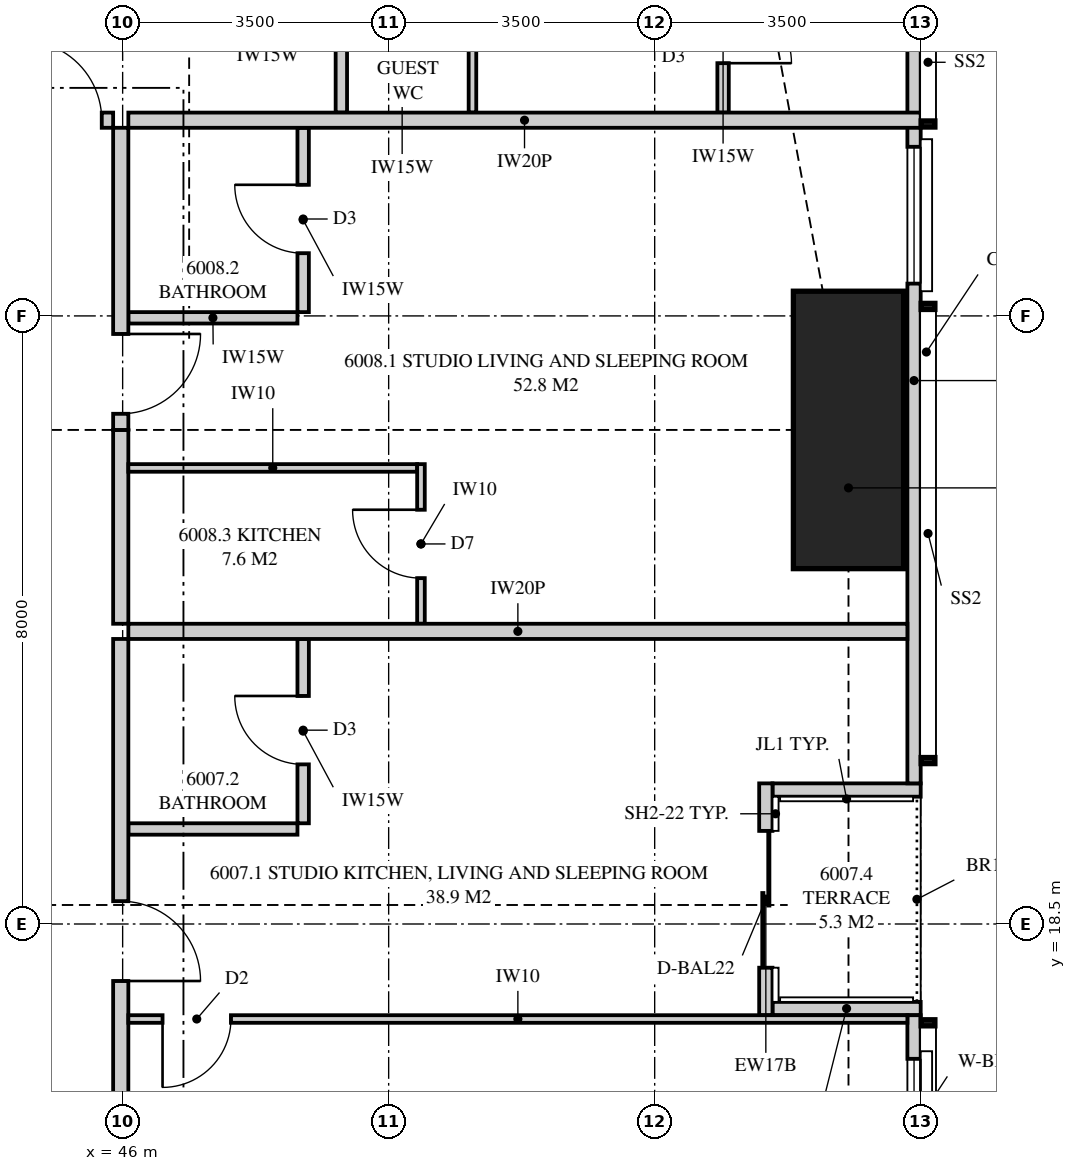
"""IFC4 building model, lengths in metres.
Left out: names, types, materials, properties, quantities, classifications, styles, units other than length and angle.
Written with IfcOpenShell. Run it as: python <this file> out.ifc"""

import sys

from ifc_helpers import new_model, si_unit, direction, frame, frame_2d, origin, origin_2d, place, context, subcontext, project, spatial, polyline, rectangle, outline, extrude, element, fill, save


model = new_model("IFC4")
c1 = context("Model", 3, precision=1e-05, world=origin(), true_north=direction((0.0, 1.0)))
c2 = subcontext(c1, "Body", "Model", "MODEL_VIEW")
j1 = project(units=[si_unit("LENGTHUNIT", "METRE"), si_unit("PLANEANGLEUNIT", "RADIAN")], contexts=[c1])
p1 = place(None, origin())
s1 = spatial("IfcSite", under=j1, at=p1, CompositionType="ELEMENT")
p2 = place(p1, origin())
s2 = spatial("IfcBuilding", under=s1, at=p2, CompositionType="ELEMENT")
p3 = place(p2, frame((0.0, 0.0, 221.45)))
s3 = spatial("IfcBuildingStorey", under=s2, at=p3, CompositionType="ELEMENT", Elevation=221.45)
p4 = place(p3, frame((55.55, 25.0, 0.0), z_axis=(0.0, 0.0, 1.0), x_axis=(1.0, 0.0, 0.0)))
e1 = element("IfcColumn", 1, at=p4, inside=s3, PredefinedType="COLUMN", context=c2, shape_type="SweptSolid", body=[
    extrude(rectangle(XDim=1.45, YDim=3.65, at=origin_2d()), origin(), (0.0, 0.0, 1.0), 3.5),
])
p5 = place(p3, frame((56.413, 3.051, 0.0), z_axis=(0.0, 0.0, 1.0), x_axis=(0.0, 1.0, 0.0)))
e2 = element("IfcWall", 2, at=p5, inside=s3, PredefinedType="SOLIDWALL", context=c2, shape_type="SweptSolid", body=[
    extrude(outline(polyline([(0.0, 0.0), (14.249, 0.0), (14.249, 2.3), (9.949, 2.3), (9.949, 3.26), (9.858, 3.26), (9.858, 2.3), (9.688, 2.3), (9.688, 3.26), (0.0, 3.26), (0.0, 0.0)])), frame((0.0, 0.087, 0.0), z_axis=(0.0, -1.0, 0.0), x_axis=(1.0, 0.0, 0.0)), (0.0, 0.0, 1.0), 0.175),
])
p6 = place(p5, frame((1.487, 0.0, 0.4)))
e3 = element("IfcOpeningElement", 3, at=p6, cuts=e2, PredefinedType="OPENING", context=c2, shape_type="SweptSolid", body=[
    extrude(rectangle(XDim=1.8, YDim=1.85, at=frame_2d((0.9, 0.925))), frame((0.0, 0.097, 0.0), z_axis=(0.0, -1.0, 0.0), x_axis=(1.0, 0.0, 0.0)), (0.0, 0.0, 1.0), 0.195),
])
p7 = place(p5, frame((5.616, 0.0, 0.4)))
e4 = element("IfcOpeningElement", 4, at=p7, cuts=e2, PredefinedType="OPENING", context=c2, shape_type="SweptSolid", body=[
    extrude(rectangle(XDim=2.4, YDim=1.85, at=frame_2d((1.2, 0.925))), frame((0.0, 0.097, 0.0), z_axis=(0.0, -1.0, 0.0), x_axis=(1.0, 0.0, 0.0)), (0.0, 0.0, 1.0), 0.195),
])
p8 = place(p5, frame((11.875, 0.0, 0.4)))
e5 = element("IfcOpeningElement", 5, at=p8, cuts=e2, PredefinedType="OPENING", context=c2, shape_type="SweptSolid", body=[
    extrude(rectangle(XDim=1.8, YDim=1.85, at=frame_2d((0.9, 0.925))), frame((0.0, 0.097, 0.0), z_axis=(0.0, -1.0, 0.0), x_axis=(1.0, 0.0, 0.0)), (0.0, 0.0, 1.0), 0.195),
])
p9 = place(p3, frame((56.413, 20.35, 0.0), z_axis=(0.0, 0.0, 1.0), x_axis=(0.0, 1.0, 0.0)))
e6 = element("IfcWall", 6, at=p9, inside=s3, PredefinedType="SOLIDWALL", context=c2, shape_type="SweptSolid", body=[
    extrude(outline(polyline([(0.0, 0.0), (10.599, 0.0), (10.599, 3.26), (4.858, 3.26), (4.858, 2.3), (4.793, 2.3), (4.793, 3.26), (4.65, 3.26), (4.65, 2.3), (0.0, 2.3), (0.0, 0.0)])), frame((0.0, 0.087, 0.0), z_axis=(0.0, -1.0, 0.0), x_axis=(1.0, 0.0, 0.0)), (0.0, 0.0, 1.0), 0.175),
])
p10 = place(p9, frame((6.575, 0.0, 0.4)))
e7 = element("IfcOpeningElement", 7, at=p10, cuts=e6, PredefinedType="OPENING", context=c2, shape_type="SweptSolid", body=[
    extrude(rectangle(XDim=1.8, YDim=1.85, at=frame_2d((0.9, 0.925))), frame((0.0, 0.097, 0.0), z_axis=(0.0, -1.0, 0.0), x_axis=(1.0, 0.0, 0.0)), (0.0, 0.0, 1.0), 0.195),
])
p11 = place(p3, frame((54.462, 17.3, 0.0), z_axis=(0.0, 0.0, 1.0), x_axis=(0.0, 1.0, 0.0)))
e8 = element("IfcWall", 8, at=p11, inside=s3, PredefinedType="SOLIDWALL", context=c2, shape_type="SweptSolid", body=[
    extrude(outline(polyline([(0.0, 0.0), (3.05, 0.0), (3.05, 3.26), (2.65, 3.26), (2.65, 2.66), (0.25, 2.66), (0.25, 3.26), (0.0, 3.26), (0.0, 0.0)])), frame((0.0, 0.087, 0.0), z_axis=(0.0, -1.0, 0.0), x_axis=(1.0, 0.0, 0.0)), (0.0, 0.0, 1.0), 0.175),
])
p12 = place(p11, frame((0.625, 0.0, 0.0)))
e9 = element("IfcOpeningElement", 9, at=p12, cuts=e8, PredefinedType="OPENING", context=c2, shape_type="SweptSolid", body=[
    extrude(rectangle(XDim=1.8, YDim=2.25, at=frame_2d((0.9, 1.125))), frame((0.0, 0.097, 0.0), z_axis=(0.0, -1.0, 0.0), x_axis=(1.0, 0.0, 0.0)), (0.0, 0.0, 1.0), 0.195),
])
for number, where, z_axis, x_axis in (
    (10, (56.5, 17.387, 0.0), (0.0, 0.0, 1.0), (-1.0, 0.0, 0.0)),
    (11, (56.5, 20.262, 0.0), (0.0, 0.0, 1.0), (-1.0, 0.0, 0.0)),
):
    element("IfcWall", number, at=place(p3, frame(where, z_axis=z_axis, x_axis=x_axis)), inside=s3, PredefinedType="SOLIDWALL", context=c2, shape_type="SweptSolid", body=[
        extrude(outline(polyline([(0.0, 0.0), (1.95, 0.0), (1.95, 3.26), (1.75, 3.26), (1.75, 2.3), (0.15, 2.3), (0.15, 3.26), (0.0, 3.26), (0.0, 0.0)])), frame((0.0, 0.087, 0.0), z_axis=(0.0, -1.0, 0.0), x_axis=(1.0, 0.0, 0.0)), (0.0, 0.0, 1.0), 0.175),
    ])
p13 = place(p3, frame((38.8, 29.075, 0.0), z_axis=(0.0, 0.0, 1.0), x_axis=(1.0, 0.0, 0.0)))
e12 = element("IfcWall", 12, at=p13, inside=s3, PredefinedType="PARTITIONING", context=c2, shape_type="SweptSolid", body=[
    extrude(outline(polyline([(0.0, 0.0), (7.075, 0.0), (7.075, 3.26), (7.075, 2.66), (6.765, 2.66), (6.765, 3.26), (0.0, 3.26), (0.0, 0.0)])), frame((0.0, 0.1, 0.0), z_axis=(0.0, -1.0, 0.0), x_axis=(1.0, 0.0, 0.0)), (0.0, 0.0, 1.0), 0.2),
])
p14 = place(p13, frame((5.875, 0.0, 0.0)))
e13 = element("IfcOpeningElement", 13, at=p14, cuts=e12, PredefinedType="OPENING", context=c2, shape_type="SweptSolid", body=[
    extrude(rectangle(XDim=1.05, YDim=2.2, at=frame_2d((0.525, 1.1))), frame((0.0, 0.11, 0.0), z_axis=(0.0, -1.0, 0.0), x_axis=(1.0, 0.0, 0.0)), (0.0, 0.0, 1.0), 0.22),
])
p15 = place(p3, frame((53.9, 31.4, 0.0), z_axis=(0.0, 0.0, 1.0), x_axis=(0.0, -1.0, 0.0)))
e14 = element("IfcWall", 14, at=p15, inside=s3, PredefinedType="PLUMBINGWALL", context=c2, shape_type="SweptSolid", body=[
    extrude(outline(polyline([(0.0, 0.0), (2.225, 0.0), (2.225, 3.26), (2.225, 2.3), (0.438, 2.3), (0.0, 2.3), (0.0, 3.26), (0.0, 0.0)])), frame((0.0, 0.075, 0.0), z_axis=(0.0, -1.0, 0.0), x_axis=(1.0, 0.0, 0.0)), (0.0, 0.0, 1.0), 0.15),
])
p16 = place(p15, frame((0.675, 0.0, 0.0)))
e15 = element("IfcOpeningElement", 15, at=p16, cuts=e14, PredefinedType="OPENING", context=c2, shape_type="SweptSolid", body=[
    extrude(rectangle(XDim=0.9, YDim=2.1, at=frame_2d((0.45, 1.05))), frame((0.0, 0.085, 0.0), z_axis=(0.0, -1.0, 0.0), x_axis=(1.0, 0.0, 0.0)), (0.0, 0.0, 1.0), 0.17),
])
p17 = place(p3, frame((50.603, 33.825, 0.0), z_axis=(0.0, 0.0, 1.0), x_axis=(0.0, -1.0, 0.0)))
e16 = element("IfcWall", 16, at=p17, inside=s3, PredefinedType="PARTITIONING", context=c2, shape_type="SweptSolid", body=[
    extrude(outline(polyline([(0.0, 0.0), (4.65, 0.0), (4.65, 3.26), (2.279, 3.26), (2.279, 2.3), (0.534, 2.3), (0.534, 3.26), (0.0, 3.26), (0.0, 0.0)])), frame((0.0, 0.05, 0.0), z_axis=(0.0, -1.0, 0.0), x_axis=(1.0, 0.0, 0.0)), (0.0, 0.0, 1.0), 0.1),
])
p18 = place(p17, frame((0.15, 0.0, 0.0)))
e17 = element("IfcOpeningElement", 17, at=p18, cuts=e16, PredefinedType="OPENING", context=c2, shape_type="SweptSolid", body=[
    extrude(rectangle(XDim=0.9, YDim=2.1, at=frame_2d((0.45, 1.05))), frame((0.0, 0.06, 0.0), z_axis=(0.0, -1.0, 0.0), x_axis=(1.0, 0.0, 0.0)), (0.0, 0.0, 1.0), 0.12),
])
p19 = place(p3, frame((46.075, 29.075, 0.0), z_axis=(0.0, 0.0, 1.0), x_axis=(1.0, 0.0, 0.0)))
e18 = element("IfcWall", 18, at=p19, inside=s3, PredefinedType="PARTITIONING", context=c2, shape_type="SweptSolid", body=[
    extrude(outline(polyline([(0.0, 0.0), (10.425, 0.0), (10.425, 3.26), (9.646, 3.26), (9.646, 2.3), (7.795, 2.3), (7.795, 3.26), (2.11, 3.26), (2.11, 2.66), (0.0, 2.66), (0.0, 3.26), (0.0, 0.0)])), frame((0.0, 0.1, 0.0), z_axis=(0.0, -1.0, 0.0), x_axis=(1.0, 0.0, 0.0)), (0.0, 0.0, 1.0), 0.2),
])
p20 = place(p3, frame((56.325, 22.35, 0.0), z_axis=(0.0, 0.0, 1.0), x_axis=(-1.0, 0.0, 0.0)))
e19 = element("IfcWall", 19, at=p20, inside=s3, PredefinedType="PARTITIONING", context=c2, shape_type="SweptSolid", body=[
    extrude(outline(polyline([(0.0, 0.0), (10.25, 0.0), (10.25, 3.26), (1.685, 3.26), (1.685, 2.3), (0.0, 2.3), (0.0, 3.26), (0.0, 0.0)])), frame((0.0, 0.1, 0.0), z_axis=(0.0, -1.0, 0.0), x_axis=(1.0, 0.0, 0.0)), (0.0, 0.0, 1.0), 0.2),
])
p21 = place(p3, frame((45.975, 14.25, 0.0), z_axis=(0.0, 0.0, 1.0), x_axis=(0.0, 1.0, 0.0)))
e20 = element("IfcWall", 20, at=p21, inside=s3, PredefinedType="PARTITIONING", context=c2, shape_type="SweptSolid", body=[
    extrude(outline(polyline([(0.0, 0.0), (8.0, 0.0), (8.0, 3.26), (5.81, 3.26), (5.81, 2.66), (3.19, 2.66), (3.19, 3.26), (0.06, 3.26), (0.06, 2.66), (0.0, 2.66), (0.0, 3.26), (0.0, 0.0)])), frame((0.0, 0.1, 0.0), z_axis=(0.0, -1.0, 0.0), x_axis=(1.0, 0.0, 0.0)), (0.0, 0.0, 1.0), 0.2),
])
p22 = place(p21, frame((3.5, 0.0, 0.0)))
e21 = element("IfcOpeningElement", 21, at=p22, cuts=e20, PredefinedType="OPENING", context=c2, shape_type="SweptSolid", body=[
    extrude(rectangle(XDim=1.05, YDim=2.2, at=frame_2d((0.525, 1.1))), frame((0.0, 0.11, 0.0), z_axis=(0.0, -1.0, 0.0), x_axis=(1.0, 0.0, 0.0)), (0.0, 0.0, 1.0), 0.22),
])
p23 = place(p3, frame((48.375, 19.825, 0.0), z_axis=(0.0, 0.0, 1.0), x_axis=(0.0, 1.0, 0.0)))
e22 = element("IfcWall", 22, at=p23, inside=s3, PredefinedType="PLUMBINGWALL", context=c2, shape_type="SweptSolid", body=[
    extrude(outline(polyline([(0.0, 0.0), (2.425, 0.0), (2.425, 3.26), (0.21, 3.26), (0.21, 2.66), (0.0, 2.66), (0.0, 3.26), (0.0, 0.0)])), frame((0.0, 0.075, 0.0), z_axis=(0.0, -1.0, 0.0), x_axis=(1.0, 0.0, 0.0)), (0.0, 0.0, 1.0), 0.15),
])
p24 = place(p23, frame((0.775, 0.0, 0.0)))
e23 = element("IfcOpeningElement", 23, at=p24, cuts=e22, PredefinedType="OPENING", context=c2, shape_type="SweptSolid", body=[
    extrude(rectangle(XDim=0.9, YDim=2.1, at=frame_2d((0.45, 1.05))), frame((0.0, 0.085, 0.0), z_axis=(0.0, -1.0, 0.0), x_axis=(1.0, 0.0, 0.0)), (0.0, 0.0, 1.0), 0.17),
])
p25 = place(p3, frame((48.3, 19.75, 0.0), z_axis=(0.0, 0.0, 1.0), x_axis=(-1.0, 0.0, 0.0)))
e24 = element("IfcWall", 24, at=p25, inside=s3, PredefinedType="PLUMBINGWALL", context=c2, shape_type="SweptSolid", body=[
    extrude(outline(polyline([(0.0, 0.0), (2.225, 0.0), (2.225, 3.26), (2.225, 2.66), (0.0, 2.66), (0.0, 3.26), (0.0, 0.0)])), frame((0.0, 0.075, 0.0), z_axis=(0.0, -1.0, 0.0), x_axis=(1.0, 0.0, 0.0)), (0.0, 0.0, 1.0), 0.15),
])
p26 = place(p3, frame((56.325, 17.25, 0.0), z_axis=(0.0, 0.0, 1.0), x_axis=(-1.0, 0.0, 0.0)))
e25 = element("IfcWall", 25, at=p26, inside=s3, PredefinedType="PARTITIONING", context=c2, shape_type="SweptSolid", body=[
    extrude(outline(polyline([(0.0, 0.0), (10.25, 0.0), (10.25, 3.26), (1.635, 3.26), (1.635, 2.3), (0.0, 2.3), (0.0, 3.26), (0.0, 0.0)])), frame((0.0, 0.05, 0.0), z_axis=(0.0, -1.0, 0.0), x_axis=(1.0, 0.0, 0.0)), (0.0, 0.0, 1.0), 0.1),
])
p27 = place(p26, frame((8.9, 0.0, 0.0)))
e26 = element("IfcOpeningElement", 26, at=p27, cuts=e25, PredefinedType="OPENING", context=c2, shape_type="SweptSolid", body=[
    extrude(rectangle(XDim=0.9, YDim=2.1, at=frame_2d((0.45, 1.05))), frame((0.0, 0.06, 0.0), z_axis=(0.0, -1.0, 0.0), x_axis=(1.0, 0.0, 0.0)), (0.0, 0.0, 1.0), 0.12),
])
p28 = place(p3, frame((45.975, 22.45, 0.0), z_axis=(0.0, 0.0, 1.0), x_axis=(0.0, 1.0, 0.0)))
e27 = element("IfcWall", 27, at=p28, inside=s3, PredefinedType="PARTITIONING", context=c2, shape_type="SweptSolid", body=[
    extrude(outline(polyline([(0.0, 0.0), (2.55, 0.0), (2.55, 2.66), (1.24, 2.66), (1.24, 3.26), (0.0, 3.26), (0.0, 0.0)])), frame((0.0, 0.1, 0.0), z_axis=(0.0, -1.0, 0.0), x_axis=(1.0, 0.0, 0.0)), (0.0, 0.0, 1.0), 0.2),
])
p29 = place(p3, frame((45.975, 25.0, 0.0), z_axis=(0.0, 0.0, 1.0), x_axis=(0.0, 1.0, 0.0)))
e28 = element("IfcWall", 28, at=p29, inside=s3, PredefinedType="PARTITIONING", context=c2, shape_type="SweptSolid", body=[
    extrude(rectangle(XDim=3.975, YDim=0.2, at=frame_2d((1.988, 0.0))), origin(), (0.0, 0.0, 1.0), 2.66),
])
p30 = place(p29, frame((0.212, 0.0, 0.0)))
e29 = element("IfcOpeningElement", 29, at=p30, cuts=e28, PredefinedType="OPENING", context=c2, shape_type="SweptSolid", body=[
    extrude(rectangle(XDim=1.05, YDim=2.2, at=frame_2d((0.525, 1.1))), frame((0.0, 0.11, 0.0), z_axis=(0.0, -1.0, 0.0), x_axis=(1.0, 0.0, 0.0)), (0.0, 0.0, 1.0), 0.22),
])
p31 = place(p3, frame((48.375, 26.55, 0.0), z_axis=(0.0, 0.0, 1.0), x_axis=(0.0, 1.0, 0.0)))
e30 = element("IfcWall", 30, at=p31, inside=s3, PredefinedType="PLUMBINGWALL", context=c2, shape_type="SweptSolid", body=[
    extrude(rectangle(XDim=2.425, YDim=0.15, at=frame_2d((1.212, 0.0))), origin(), (0.0, 0.0, 1.0), 3.26),
])
p32 = place(p31, frame((0.775, 0.0, 0.0)))
e31 = element("IfcOpeningElement", 31, at=p32, cuts=e30, PredefinedType="OPENING", context=c2, shape_type="SweptSolid", body=[
    extrude(rectangle(XDim=0.9, YDim=2.1, at=frame_2d((0.45, 1.05))), frame((0.0, 0.085, 0.0), z_axis=(0.0, -1.0, 0.0), x_axis=(1.0, 0.0, 0.0)), (0.0, 0.0, 1.0), 0.17),
])
p33 = place(p3, frame((48.3, 26.475, 0.0), z_axis=(0.0, 0.0, 1.0), x_axis=(-1.0, 0.0, 0.0)))
e32 = element("IfcWall", 32, at=p33, inside=s3, PredefinedType="PLUMBINGWALL", context=c2, shape_type="SweptSolid", body=[
    extrude(outline(polyline([(0.0, 0.0), (2.225, 0.0), (2.225, 3.26), (2.225, 2.66), (0.14, 2.66), (0.14, 3.26), (0.0, 3.26), (0.0, 0.0)])), frame((0.0, 0.075, 0.0), z_axis=(0.0, -1.0, 0.0), x_axis=(1.0, 0.0, 0.0)), (0.0, 0.0, 1.0), 0.15),
])
p34 = place(p3, frame((48.877, 29.175, 0.0), z_axis=(0.0, 0.0, 1.0), x_axis=(0.0, 1.0, 0.0)))
e33 = element("IfcWall", 33, at=p34, inside=s3, PredefinedType="PLUMBINGWALL", context=c2, shape_type="SweptSolid", body=[
    extrude(rectangle(XDim=2.0, YDim=0.15, at=frame_2d((1.0, 0.0))), origin(), (0.0, 0.0, 1.0), 3.26),
])
p35 = place(p3, frame((49.925, 22.45, 0.0), z_axis=(0.0, 0.0, 1.0), x_axis=(0.0, 1.0, 0.0)))
e34 = element("IfcWall", 34, at=p35, inside=s3, PredefinedType="PARTITIONING", context=c2, shape_type="SweptSolid", body=[
    extrude(outline(polyline([(0.0, 0.0), (2.1, 0.0), (2.1, 3.26), (2.1, 2.66), (1.29, 2.66), (1.29, 3.26), (0.0, 3.26), (0.0, 0.0)])), frame((0.0, 0.05, 0.0), z_axis=(0.0, -1.0, 0.0), x_axis=(1.0, 0.0, 0.0)), (0.0, 0.0, 1.0), 0.1),
])
p36 = place(p35, frame((0.6, 0.0, 0.0)))
e35 = element("IfcOpeningElement", 35, at=p36, cuts=e34, PredefinedType="OPENING", context=c2, shape_type="SweptSolid", body=[
    extrude(rectangle(XDim=0.9, YDim=2.1, at=frame_2d((0.45, 1.05))), frame((0.0, 0.06, 0.0), z_axis=(0.0, -1.0, 0.0), x_axis=(1.0, 0.0, 0.0)), (0.0, 0.0, 1.0), 0.12),
])
p37 = place(p3, frame((46.075, 24.5, 0.0), z_axis=(0.0, 0.0, 1.0), x_axis=(1.0, 0.0, 0.0)))
e36 = element("IfcWall", 36, at=p37, inside=s3, PredefinedType="PARTITIONING", context=c2, shape_type="SweptSolid", body=[
    extrude(outline(polyline([(0.0, 0.0), (3.8, 0.0), (3.8, 3.26), (3.8, 2.66), (0.0, 2.66), (0.0, 3.26), (0.0, 0.0)])), frame((0.0, 0.05, 0.0), z_axis=(0.0, -1.0, 0.0), x_axis=(1.0, 0.0, 0.0)), (0.0, 0.0, 1.0), 0.1),
])
p38 = place(p8, origin())
e37 = element("IfcWindow", 37, at=p38, inside=s3, PartitioningType="SINGLE_PANEL", PredefinedType="WINDOW", context=c2, shape_type="SweptSolid", body=[
    extrude(rectangle(XDim=1.8, YDim=1.85, at=frame_2d((0.9, 0.925))), frame((0.0, 0.03, 0.0), z_axis=(0.0, -1.0, 0.0), x_axis=(1.0, 0.0, 0.0)), (0.0, 0.0, 1.0), 0.06),
])
fill(e5, e37)
p39 = place(p12, origin())
e38 = element("IfcDoor", 38, at=p39, inside=s3, OperationType="SLIDING_TO_LEFT", PredefinedType="DOOR", context=c2, shape_type="SweptSolid", body=[
    extrude(rectangle(XDim=1.8, YDim=2.25, at=frame_2d((0.9, 1.125))), frame((0.0, 0.025, 0.0), z_axis=(0.0, -1.0, 0.0), x_axis=(1.0, 0.0, 0.0)), (0.0, 0.0, 1.0), 0.05),
])
fill(e9, e38)
p40 = place(p10, origin())
e39 = element("IfcWindow", 39, at=p40, inside=s3, PartitioningType="SINGLE_PANEL", PredefinedType="WINDOW", context=c2, shape_type="SweptSolid", body=[
    extrude(rectangle(XDim=1.8, YDim=1.85, at=frame_2d((0.9, 0.925))), frame((0.0, 0.03, 0.0), z_axis=(0.0, -1.0, 0.0), x_axis=(1.0, 0.0, 0.0)), (0.0, 0.0, 1.0), 0.06),
])
fill(e7, e39)
p41 = place(p14, origin())
e40 = element("IfcDoor", 40, at=p41, inside=s3, OperationType="SINGLE_SWING_LEFT", PredefinedType="DOOR", context=c2, shape_type="SweptSolid", body=[
    extrude(rectangle(XDim=1.05, YDim=2.2, at=frame_2d((0.525, 1.1))), frame((0.0, 0.025, 0.0), z_axis=(0.0, -1.0, 0.0), x_axis=(1.0, 0.0, 0.0)), (0.0, 0.0, 1.0), 0.05),
])
fill(e13, e40)
p42 = place(p16, origin())
e41 = element("IfcDoor", 41, at=p42, inside=s3, OperationType="SINGLE_SWING_RIGHT", PredefinedType="DOOR", context=c2, shape_type="SweptSolid", body=[
    extrude(rectangle(XDim=0.9, YDim=2.1, at=frame_2d((0.45, 1.05))), frame((0.0, 0.025, 0.0), z_axis=(0.0, -1.0, 0.0), x_axis=(1.0, 0.0, 0.0)), (0.0, 0.0, 1.0), 0.05),
])
fill(e15, e41)
p43 = place(p22, frame((1.05, 0.0, 0.0), z_axis=(0.0, 0.0, 1.0), x_axis=(-1.0, 0.0, 0.0)))
e42 = element("IfcDoor", 42, at=p43, inside=s3, OperationType="SINGLE_SWING_RIGHT", PredefinedType="DOOR", context=c2, shape_type="SweptSolid", body=[
    extrude(rectangle(XDim=1.05, YDim=2.2, at=frame_2d((0.525, 1.1))), frame((0.0, 0.025, 0.0), z_axis=(0.0, -1.0, 0.0), x_axis=(1.0, 0.0, 0.0)), (0.0, 0.0, 1.0), 0.05),
])
fill(e21, e42)
p44 = place(p24, origin())
e43 = element("IfcDoor", 43, at=p44, inside=s3, OperationType="SINGLE_SWING_RIGHT", PredefinedType="DOOR", context=c2, shape_type="SweptSolid", body=[
    extrude(rectangle(XDim=0.9, YDim=2.1, at=frame_2d((0.45, 1.05))), frame((0.0, 0.025, 0.0), z_axis=(0.0, -1.0, 0.0), x_axis=(1.0, 0.0, 0.0)), (0.0, 0.0, 1.0), 0.05),
])
fill(e23, e43)
p45 = place(p27, origin())
e44 = element("IfcDoor", 44, at=p45, inside=s3, OperationType="SINGLE_SWING_RIGHT", PredefinedType="DOOR", context=c2, shape_type="SweptSolid", body=[
    extrude(rectangle(XDim=0.9, YDim=2.1, at=frame_2d((0.45, 1.05))), frame((0.0, 0.025, 0.0), z_axis=(0.0, -1.0, 0.0), x_axis=(1.0, 0.0, 0.0)), (0.0, 0.0, 1.0), 0.05),
])
fill(e26, e44)
p46 = place(p30, frame((1.05, 0.0, 0.0), z_axis=(0.0, 0.0, 1.0), x_axis=(-1.0, 0.0, 0.0)))
e45 = element("IfcDoor", 45, at=p46, inside=s3, OperationType="SINGLE_SWING_LEFT", PredefinedType="DOOR", context=c2, shape_type="SweptSolid", body=[
    extrude(rectangle(XDim=1.05, YDim=2.2, at=frame_2d((0.525, 1.1))), frame((0.0, 0.025, 0.0), z_axis=(0.0, -1.0, 0.0), x_axis=(1.0, 0.0, 0.0)), (0.0, 0.0, 1.0), 0.05),
])
fill(e29, e45)
p47 = place(p32, origin())
e46 = element("IfcDoor", 46, at=p47, inside=s3, OperationType="SINGLE_SWING_RIGHT", PredefinedType="DOOR", context=c2, shape_type="SweptSolid", body=[
    extrude(rectangle(XDim=0.9, YDim=2.1, at=frame_2d((0.45, 1.05))), frame((0.0, 0.025, 0.0), z_axis=(0.0, -1.0, 0.0), x_axis=(1.0, 0.0, 0.0)), (0.0, 0.0, 1.0), 0.05),
])
fill(e31, e46)
p48 = place(p36, origin())
e47 = element("IfcDoor", 47, at=p48, inside=s3, OperationType="SINGLE_SWING_RIGHT", PredefinedType="DOOR", context=c2, shape_type="SweptSolid", body=[
    extrude(rectangle(XDim=0.9, YDim=2.1, at=frame_2d((0.45, 1.05))), frame((0.0, 0.025, 0.0), z_axis=(0.0, -1.0, 0.0), x_axis=(1.0, 0.0, 0.0)), (0.0, 0.0, 1.0), 0.05),
])
fill(e35, e47)
save(model, sys.argv[1])
